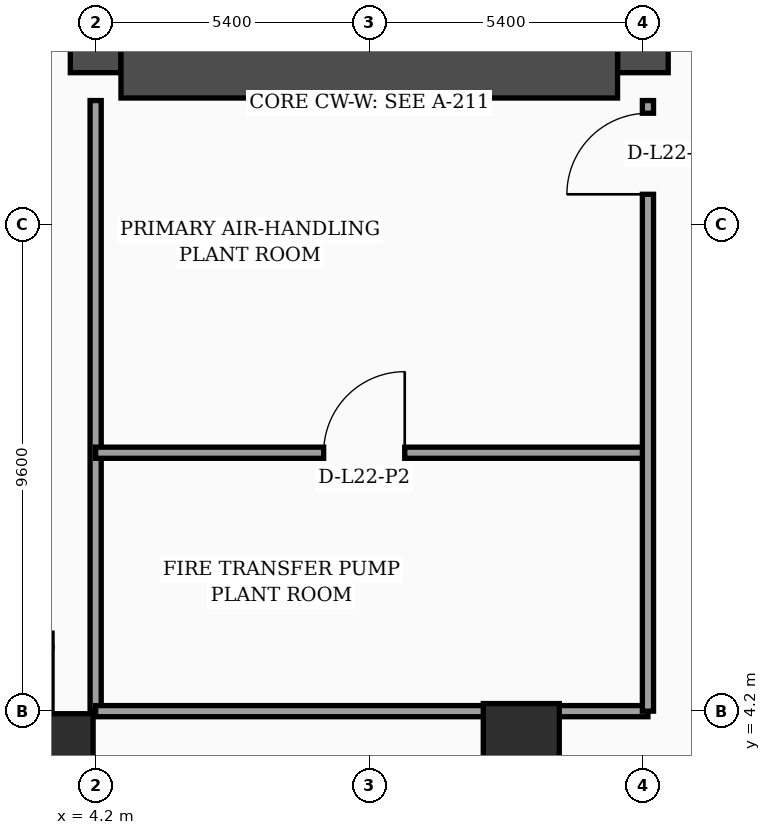
"""IFC4 building model, lengths in metres.
Left out: names, types, materials, properties, quantities, classifications, styles, units other than length and angle.
Written with IfcOpenShell. Run it as: python <this file> out.ifc"""

import sys

from ifc_helpers import new_model, si_unit, direction, frame, frame_2d, origin, origin_2d, place, context, subcontext, project, spatial, rectangle, hollow_rectangle, extrude, element, fill, save


model = new_model("IFC4")
c1 = context("Model", 3, precision=1e-05, world=origin(), true_north=direction((0.0, 1.0)))
c2 = subcontext(c1, "Body", "Model", "MODEL_VIEW")
j1 = project(units=[si_unit("LENGTHUNIT", "METRE"), si_unit("PLANEANGLEUNIT", "RADIAN")], contexts=[c1])
p1 = place(None, origin())
s1 = spatial("IfcSite", under=j1, at=p1, CompositionType="ELEMENT")
p2 = place(p1, origin())
s2 = spatial("IfcBuilding", under=s1, at=p2, CompositionType="ELEMENT")
p3 = place(p2, frame((0.0, 0.0, 92.6)))
s3 = spatial("IfcBuildingStorey", under=s2, at=p3, CompositionType="ELEMENT", Elevation=92.6)
p4 = place(p3, frame((4.2, 16.8, 0.0), z_axis=(0.0, 0.0, 1.0), x_axis=(0.0, 1.0, 0.0)))
e1 = element("IfcWall", 1, at=p4, inside=s3, PredefinedType="SHEAR", context=c2, shape_type="SweptSolid", body=[
    extrude(rectangle(XDim=21.6, YDim=1.0, at=frame_2d((10.8, 0.0))), origin(), (0.0, 0.0, 1.0), 4.35),
])
p5 = place(p3, frame((15.0, 16.8, 0.0), z_axis=(0.0, 0.0, 1.0), x_axis=(0.0, 1.0, 0.0)))
e2 = element("IfcWall", 2, at=p5, inside=s3, PredefinedType="SHEAR", context=c2, shape_type="SweptSolid", body=[
    extrude(rectangle(XDim=21.6, YDim=1.0, at=frame_2d((10.8, 0.0))), origin(), (0.0, 0.0, 1.0), 4.35),
])
p6 = place(p5, frame((8.65, 0.0, 0.0)))
e3 = element("IfcOpeningElement", 3, at=p6, cuts=e2, PredefinedType="OPENING", context=c2, shape_type="SweptSolid", body=[
    extrude(rectangle(XDim=1.1, YDim=2.2, at=frame_2d((0.55, 1.1))), frame((0.0, 0.51, 0.0), z_axis=(0.0, -1.0, 0.0), x_axis=(1.0, 0.0, 0.0)), (0.0, 0.0, 1.0), 1.02),
])
p7 = place(p5, frame((1.25, 0.0, 0.0)))
e4 = element("IfcOpeningElement", 4, at=p7, cuts=e2, PredefinedType="OPENING", context=c2, shape_type="SweptSolid", body=[
    extrude(rectangle(XDim=1.1, YDim=2.2, at=frame_2d((0.55, 1.1))), frame((0.0, 0.51, 0.0), z_axis=(0.0, -1.0, 0.0), x_axis=(1.0, 0.0, 0.0)), (0.0, 0.0, 1.0), 1.02),
])
p8 = place(p5, frame((3.8, 0.0, 0.0)))
e5 = element("IfcOpeningElement", 5, at=p8, cuts=e2, PredefinedType="OPENING", context=c2, shape_type="SweptSolid", body=[
    extrude(rectangle(XDim=1.1, YDim=2.2, at=frame_2d((0.55, 1.1))), frame((0.0, 0.51, 0.0), z_axis=(0.0, -1.0, 0.0), x_axis=(1.0, 0.0, 0.0)), (0.0, 0.0, 1.0), 1.02),
])
p9 = place(p5, frame((6.35, 0.0, 0.0)))
e6 = element("IfcOpeningElement", 6, at=p9, cuts=e2, PredefinedType="OPENING", context=c2, shape_type="SweptSolid", body=[
    extrude(rectangle(XDim=1.1, YDim=2.2, at=frame_2d((0.55, 1.1))), frame((0.0, 0.51, 0.0), z_axis=(0.0, -1.0, 0.0), x_axis=(1.0, 0.0, 0.0)), (0.0, 0.0, 1.0), 1.02),
])
p10 = place(p5, frame((10.85, 0.0, 0.0)))
e7 = element("IfcOpeningElement", 7, at=p10, cuts=e2, PredefinedType="OPENING", context=c2, shape_type="SweptSolid", body=[
    extrude(rectangle(XDim=1.1, YDim=2.2, at=frame_2d((0.55, 1.1))), frame((0.0, 0.51, 0.0), z_axis=(0.0, -1.0, 0.0), x_axis=(1.0, 0.0, 0.0)), (0.0, 0.0, 1.0), 1.02),
])
p11 = place(p5, frame((13.5, 0.0, 0.0)))
e8 = element("IfcOpeningElement", 8, at=p11, cuts=e2, PredefinedType="OPENING", context=c2, shape_type="SweptSolid", body=[
    extrude(rectangle(XDim=1.1, YDim=2.2, at=frame_2d((0.55, 1.1))), frame((0.0, 0.51, 0.0), z_axis=(0.0, -1.0, 0.0), x_axis=(1.0, 0.0, 0.0)), (0.0, 0.0, 1.0), 1.02),
])
p12 = place(p5, frame((16.15, 0.0, 0.0)))
e9 = element("IfcOpeningElement", 9, at=p12, cuts=e2, PredefinedType="OPENING", context=c2, shape_type="SweptSolid", body=[
    extrude(rectangle(XDim=1.1, YDim=2.2, at=frame_2d((0.55, 1.1))), frame((0.0, 0.51, 0.0), z_axis=(0.0, -1.0, 0.0), x_axis=(1.0, 0.0, 0.0)), (0.0, 0.0, 1.0), 1.02),
])
p13 = place(p3, frame((4.7, 16.8, 0.0), z_axis=(0.0, 0.0, 1.0), x_axis=(1.0, 0.0, 0.0)))
e10 = element("IfcWall", 10, at=p13, inside=s3, PredefinedType="SHEAR", context=c2, shape_type="SweptSolid", body=[
    extrude(rectangle(XDim=9.8, YDim=1.0, at=frame_2d((4.9, 0.0))), origin(), (0.0, 0.0, 1.0), 4.35),
])
p14 = place(p3, frame((3.6, 3.6, 0.0), z_axis=(0.0, 0.0, 1.0), x_axis=(1.0, 0.0, 0.0)))
e11 = element("IfcColumn", 11, at=p14, inside=s3, PredefinedType="COLUMN", context=c2, shape_type="SweptSolid", body=[
    extrude(hollow_rectangle(XDim=1.1, YDim=1.1, WallThickness=0.045, at=origin_2d()), origin(), (0.0, 0.0, 1.0), 4.35),
])
p15 = place(p3, frame((12.6, 3.6, 0.0), z_axis=(0.0, 0.0, 1.0), x_axis=(1.0, 0.0, 0.0)))
e12 = element("IfcColumn", 12, at=p15, inside=s3, PredefinedType="COLUMN", context=c2, shape_type="SweptSolid", body=[
    extrude(rectangle(XDim=1.5, YDim=1.5, at=origin_2d()), origin(), (0.0, 0.0, 1.0), 4.35),
])
p16 = place(p3, frame((4.2, 4.2, 0.0), z_axis=(0.0, 0.0, 1.0), x_axis=(0.0, 1.0, 0.0)))
e13 = element("IfcWall", 13, at=p16, inside=s3, PredefinedType="SOLIDWALL", context=c2, shape_type="SweptSolid", body=[
    extrude(rectangle(XDim=12.05, YDim=0.22, at=frame_2d((6.025, 0.0))), origin(), (0.0, 0.0, 1.0), 3.65),
])
p17 = place(p3, frame((4.2, 4.2, 0.0), z_axis=(0.0, 0.0, 1.0), x_axis=(1.0, 0.0, 0.0)))
e14 = element("IfcWall", 14, at=p17, inside=s3, PredefinedType="SOLIDWALL", context=c2, shape_type="SweptSolid", body=[
    extrude(rectangle(XDim=10.9, YDim=0.22, at=frame_2d((5.45, 0.0))), origin(), (0.0, 0.0, 1.0), 3.65),
])
p18 = place(p3, frame((4.2, 9.3, 0.0), z_axis=(0.0, 0.0, 1.0), x_axis=(1.0, 0.0, 0.0)))
e15 = element("IfcWall", 15, at=p18, inside=s3, PredefinedType="SOLIDWALL", context=c2, shape_type="SweptSolid", body=[
    extrude(rectangle(XDim=10.9, YDim=0.22, at=frame_2d((5.45, 0.0))), origin(), (0.0, 0.0, 1.0), 3.65),
])
p19 = place(p18, frame((4.5, 0.0, 0.0)))
e16 = element("IfcOpeningElement", 16, at=p19, cuts=e15, PredefinedType="OPENING", context=c2, shape_type="SweptSolid", body=[
    extrude(rectangle(XDim=1.6, YDim=2.35, at=frame_2d((0.8, 1.175))), frame((0.0, 0.12, 0.0), z_axis=(0.0, -1.0, 0.0), x_axis=(1.0, 0.0, 0.0)), (0.0, 0.0, 1.0), 0.24),
])
p20 = place(p3, frame((15.1, 4.2, 0.0), z_axis=(0.0, 0.0, 1.0), x_axis=(0.0, 1.0, 0.0)))
e17 = element("IfcWall", 17, at=p20, inside=s3, PredefinedType="SOLIDWALL", context=c2, shape_type="SweptSolid", body=[
    extrude(rectangle(XDim=12.05, YDim=0.22, at=frame_2d((6.025, 0.0))), origin(), (0.0, 0.0, 1.0), 3.15),
])
p21 = place(p20, frame((10.2, 0.0, 0.0)))
e18 = element("IfcOpeningElement", 18, at=p21, cuts=e17, PredefinedType="OPENING", context=c2, shape_type="SweptSolid", body=[
    extrude(rectangle(XDim=1.6, YDim=2.35, at=frame_2d((0.8, 1.175))), frame((0.0, 0.12, 0.0), z_axis=(0.0, -1.0, 0.0), x_axis=(1.0, 0.0, 0.0)), (0.0, 0.0, 1.0), 0.24),
])
p22 = place(p19, origin())
e19 = element("IfcDoor", 19, at=p22, inside=s3, OperationType="SINGLE_SWING_RIGHT", PredefinedType="DOOR", context=c2, shape_type="SweptSolid", body=[
    extrude(rectangle(XDim=1.6, YDim=2.35, at=frame_2d((0.8, 1.175))), frame((0.0, 0.025, 0.0), z_axis=(0.0, -1.0, 0.0), x_axis=(1.0, 0.0, 0.0)), (0.0, 0.0, 1.0), 0.05),
])
fill(e16, e19)
p23 = place(p21, origin())
e20 = element("IfcDoor", 20, at=p23, inside=s3, OperationType="SINGLE_SWING_LEFT", PredefinedType="DOOR", context=c2, shape_type="SweptSolid", body=[
    extrude(rectangle(XDim=1.6, YDim=2.35, at=frame_2d((0.8, 1.175))), frame((0.0, 0.025, 0.0), z_axis=(0.0, -1.0, 0.0), x_axis=(1.0, 0.0, 0.0)), (0.0, 0.0, 1.0), 0.05),
])
fill(e18, e20)
save(model, sys.argv[1])
